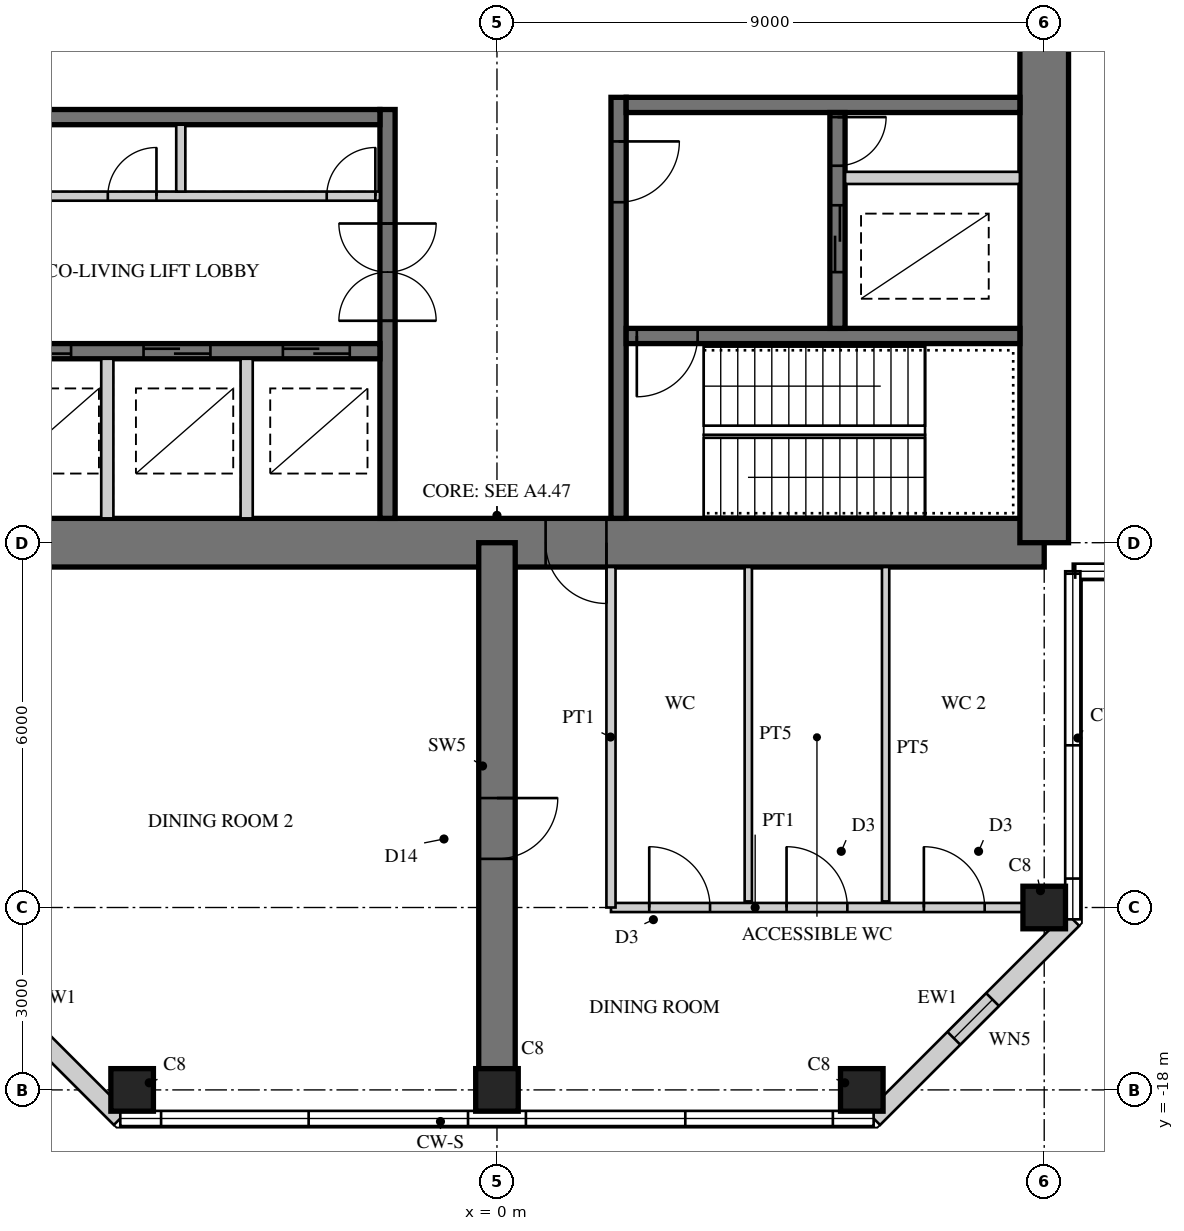
"""IFC4 building model, lengths in metres.
Left out: names, types, materials, properties, quantities, classifications, styles, units other than length and angle.
Written with IfcOpenShell. Run it as: python <this file> out.ifc"""

import sys

from ifc_helpers import new_model, si_unit, direction, frame, frame_2d, origin, origin_2d, place, context, subcontext, project, spatial, rectangle, hollow_rectangle, extrude, element, fill, save


model = new_model("IFC4")
c1 = context("Model", 3, precision=1e-05, world=origin(), true_north=direction((0.0, 1.0)))
c2 = subcontext(c1, "Body", "Model", "MODEL_VIEW")
j1 = project(units=[si_unit("LENGTHUNIT", "METRE"), si_unit("PLANEANGLEUNIT", "RADIAN")], contexts=[c1])
p1 = place(None, origin())
s1 = spatial("IfcSite", under=j1, at=p1, CompositionType="ELEMENT")
p2 = place(p1, origin())
s2 = spatial("IfcBuilding", under=s1, at=p2, CompositionType="ELEMENT")
p3 = place(p2, frame((0.0, 0.0, 288.3)))
s3 = spatial("IfcBuildingStorey", under=s2, at=p3, CompositionType="ELEMENT", Elevation=288.3)
p4 = place(p3, frame((-9.0, -9.0, 0.0), z_axis=(0.0, 0.0, 1.0), x_axis=(1.0, 0.0, 0.0)))
e1 = element("IfcWall", 1, at=p4, inside=s3, PredefinedType="SHEAR", context=c2, shape_type="SweptSolid", body=[
    extrude(rectangle(XDim=18.0, YDim=0.8, at=frame_2d((9.0, 0.0))), origin(), (0.0, 0.0, 1.0), 5.0),
])
p5 = place(p4, frame((9.8, 0.0, 0.0)))
e2 = element("IfcOpeningElement", 2, at=p5, cuts=e1, PredefinedType="OPENING", context=c2, shape_type="SweptSolid", body=[
    extrude(rectangle(XDim=1.0, YDim=2.4, at=frame_2d((0.5, 1.2))), frame((0.0, 0.41, 0.0), z_axis=(0.0, -1.0, 0.0), x_axis=(1.0, 0.0, 0.0)), (0.0, 0.0, 1.0), 0.82),
])
p6 = place(p3, frame((9.0, -9.0, 0.0), z_axis=(0.0, 0.0, 1.0), x_axis=(0.0, 1.0, 0.0)))
e3 = element("IfcWall", 3, at=p6, inside=s3, PredefinedType="SHEAR", context=c2, shape_type="SweptSolid", body=[
    extrude(rectangle(XDim=18.0, YDim=0.8, at=frame_2d((9.0, 0.0))), origin(), (0.0, 0.0, 1.0), 5.0),
])
p7 = place(p6, frame((9.8, 0.0, 0.0)))
e4 = element("IfcOpeningElement", 4, at=p7, cuts=e3, PredefinedType="OPENING", context=c2, shape_type="SweptSolid", body=[
    extrude(rectangle(XDim=1.0, YDim=2.4, at=frame_2d((0.5, 1.2))), frame((0.0, 0.41, 0.0), z_axis=(0.0, -1.0, 0.0), x_axis=(1.0, 0.0, 0.0)), (0.0, 0.0, 1.0), 0.82),
])
p8 = place(p3, frame((-1.8, -1.875, 0.0), z_axis=(0.0, 0.0, 1.0), x_axis=(0.0, -1.0, 0.0)))
e5 = element("IfcWall", 5, at=p8, inside=s3, PredefinedType="SHEAR", context=c2, shape_type="SweptSolid", body=[
    extrude(rectangle(XDim=6.725, YDim=0.25, at=frame_2d((3.363, 0.0))), origin(), (0.0, 0.0, 1.0), 5.0),
])
p9 = place(p8, frame((1.875, 0.0, 0.0)))
e6 = element("IfcOpeningElement", 6, at=p9, cuts=e5, PredefinedType="OPENING", context=c2, shape_type="SweptSolid", body=[
    extrude(rectangle(XDim=1.6, YDim=2.4, at=frame_2d((0.8, 1.2))), frame((0.0, 0.135, 0.0), z_axis=(0.0, -1.0, 0.0), x_axis=(1.0, 0.0, 0.0)), (0.0, 0.0, 1.0), 0.27),
])
p10 = place(p3, frame((-1.925, -2.0, 0.0), z_axis=(0.0, 0.0, 1.0), x_axis=(-1.0, 0.0, 0.0)))
e7 = element("IfcWall", 7, at=p10, inside=s3, PredefinedType="SHEAR", context=c2, shape_type="SweptSolid", body=[
    extrude(rectangle(XDim=6.675, YDim=0.25, at=frame_2d((3.337, 0.0))), origin(), (0.0, 0.0, 1.0), 5.0),
])
p11 = place(p3, frame((-1.925, -5.85, 0.0), z_axis=(0.0, 0.0, 1.0), x_axis=(-1.0, 0.0, 0.0)))
e8 = element("IfcWall", 8, at=p11, inside=s3, PredefinedType="SHEAR", context=c2, shape_type="SweptSolid", body=[
    extrude(rectangle(XDim=6.675, YDim=0.25, at=frame_2d((3.337, 0.0))), origin(), (0.0, 0.0, 1.0), 5.0),
])
p12 = place(p11, frame((0.496, 0.0, 0.0)))
e9 = element("IfcOpeningElement", 9, at=p12, cuts=e8, PredefinedType="OPENING", context=c2, shape_type="SweptSolid", body=[
    extrude(rectangle(XDim=1.1, YDim=2.2, at=frame_2d((0.55, 1.1))), frame((0.0, 0.135, 0.0), z_axis=(0.0, -1.0, 0.0), x_axis=(1.0, 0.0, 0.0)), (0.0, 0.0, 1.0), 0.27),
])
p13 = place(p11, frame((2.788, 0.0, 0.0)))
e10 = element("IfcOpeningElement", 10, at=p13, cuts=e8, PredefinedType="OPENING", context=c2, shape_type="SweptSolid", body=[
    extrude(rectangle(XDim=1.1, YDim=2.2, at=frame_2d((0.55, 1.1))), frame((0.0, 0.135, 0.0), z_axis=(0.0, -1.0, 0.0), x_axis=(1.0, 0.0, 0.0)), (0.0, 0.0, 1.0), 0.27),
])
p14 = place(p11, frame((5.079, 0.0, 0.0)))
e11 = element("IfcOpeningElement", 11, at=p14, cuts=e8, PredefinedType="OPENING", context=c2, shape_type="SweptSolid", body=[
    extrude(rectangle(XDim=1.1, YDim=2.2, at=frame_2d((0.55, 1.1))), frame((0.0, 0.135, 0.0), z_axis=(0.0, -1.0, 0.0), x_axis=(1.0, 0.0, 0.0)), (0.0, 0.0, 1.0), 0.27),
])
p15 = place(p3, frame((-1.925, -3.3, 0.0), z_axis=(0.0, 0.0, 1.0), x_axis=(-1.0, 0.0, 0.0)))
e12 = element("IfcWall", 12, at=p15, inside=s3, PredefinedType="PARTITIONING", context=c2, shape_type="SweptSolid", body=[
    extrude(rectangle(XDim=6.675, YDim=0.15, at=frame_2d((3.337, 0.0))), origin(), (0.0, 0.0, 1.0), 5.0),
])
p16 = place(p15, frame((0.075, 0.0, 0.0)))
e13 = element("IfcOpeningElement", 13, at=p16, cuts=e12, PredefinedType="OPENING", context=c2, shape_type="SweptSolid", body=[
    extrude(rectangle(XDim=0.8, YDim=2.1, at=frame_2d((0.4, 1.05))), frame((0.0, 0.085, 0.0), z_axis=(0.0, -1.0, 0.0), x_axis=(1.0, 0.0, 0.0)), (0.0, 0.0, 1.0), 0.17),
])
p17 = place(p15, frame((3.675, 0.0, 0.0)))
e14 = element("IfcOpeningElement", 14, at=p17, cuts=e12, PredefinedType="OPENING", context=c2, shape_type="SweptSolid", body=[
    extrude(rectangle(XDim=0.8, YDim=2.1, at=frame_2d((0.4, 1.05))), frame((0.0, 0.085, 0.0), z_axis=(0.0, -1.0, 0.0), x_axis=(1.0, 0.0, 0.0)), (0.0, 0.0, 1.0), 0.17),
])
p18 = place(p3, frame((-5.2, -2.125, 0.0), z_axis=(0.0, 0.0, 1.0), x_axis=(0.0, -1.0, 0.0)))
e15 = element("IfcWall", 15, at=p18, inside=s3, PredefinedType="PARTITIONING", context=c2, shape_type="SweptSolid", body=[
    extrude(rectangle(XDim=1.1, YDim=0.15, at=frame_2d((0.55, 0.0))), origin(), (0.0, 0.0, 1.0), 5.0),
])
for number, where, z_axis, x_axis in (
    (16, (-4.117, -5.975, 0.0), (0.0, 0.0, 1.0), (0.0, -1.0, 0.0)),
    (17, (-6.408, -5.975, 0.0), (0.0, 0.0, 1.0), (0.0, -1.0, 0.0)),
):
    element("IfcWall", number, at=place(p3, frame(where, z_axis=z_axis, x_axis=x_axis)), inside=s3, PredefinedType="PARTITIONING", context=c2, shape_type="SweptSolid", body=[
        extrude(rectangle(XDim=2.625, YDim=0.2, at=frame_2d((1.312, 0.0))), origin(), (0.0, 0.0, 1.0), 5.0),
    ])
p19 = place(p3, frame((2.0, -1.675, 0.0), z_axis=(0.0, 0.0, 1.0), x_axis=(0.0, -1.0, 0.0)))
e18 = element("IfcWall", 18, at=p19, inside=s3, PredefinedType="SHEAR", context=c2, shape_type="SweptSolid", body=[
    extrude(rectangle(XDim=6.925, YDim=0.25, at=frame_2d((3.462, 0.0))), origin(), (0.0, 0.0, 1.0), 5.0),
])
p20 = place(p19, frame((0.725, 0.0, 0.0)))
e19 = element("IfcOpeningElement", 19, at=p20, cuts=e18, PredefinedType="OPENING", context=c2, shape_type="SweptSolid", body=[
    extrude(rectangle(XDim=1.0, YDim=2.1, at=frame_2d((0.5, 1.05))), frame((0.0, 0.135, 0.0), z_axis=(0.0, -1.0, 0.0), x_axis=(1.0, 0.0, 0.0)), (0.0, 0.0, 1.0), 0.27),
])
p21 = place(p3, frame((2.125, -1.8, 0.0), z_axis=(0.0, 0.0, 1.0), x_axis=(1.0, 0.0, 0.0)))
e20 = element("IfcWall", 20, at=p21, inside=s3, PredefinedType="SHEAR", context=c2, shape_type="SweptSolid", body=[
    extrude(rectangle(XDim=6.475, YDim=0.25, at=frame_2d((3.238, 0.0))), origin(), (0.0, 0.0, 1.0), 5.0),
])
p22 = place(p3, frame((2.125, -5.6, 0.0), z_axis=(0.0, 0.0, 1.0), x_axis=(1.0, 0.0, 0.0)))
e21 = element("IfcWall", 21, at=p22, inside=s3, PredefinedType="SHEAR", context=c2, shape_type="SweptSolid", body=[
    extrude(rectangle(XDim=6.475, YDim=0.25, at=frame_2d((3.238, 0.0))), origin(), (0.0, 0.0, 1.0), 5.0),
])
p23 = place(p22, frame((0.175, 0.0, 0.0)))
e22 = element("IfcOpeningElement", 22, at=p23, cuts=e21, PredefinedType="OPENING", context=c2, shape_type="SweptSolid", body=[
    extrude(rectangle(XDim=1.0, YDim=2.1, at=frame_2d((0.5, 1.05))), frame((0.0, 0.135, 0.0), z_axis=(0.0, -1.0, 0.0), x_axis=(1.0, 0.0, 0.0)), (0.0, 0.0, 1.0), 0.27),
])
p24 = place(p3, frame((5.6, -1.925, 0.0), z_axis=(0.0, 0.0, 1.0), x_axis=(0.0, -1.0, 0.0)))
e23 = element("IfcWall", 23, at=p24, inside=s3, PredefinedType="SHEAR", context=c2, shape_type="SweptSolid", body=[
    extrude(rectangle(XDim=3.55, YDim=0.25, at=frame_2d((1.775, 0.0))), origin(), (0.0, 0.0, 1.0), 5.0),
])
p25 = place(p24, frame((1.525, 0.0, 0.0)))
e24 = element("IfcOpeningElement", 24, at=p25, cuts=e23, PredefinedType="OPENING", context=c2, shape_type="SweptSolid", body=[
    extrude(rectangle(XDim=1.1, YDim=2.2, at=frame_2d((0.55, 1.1))), frame((0.0, 0.135, 0.0), z_axis=(0.0, -1.0, 0.0), x_axis=(1.0, 0.0, 0.0)), (0.0, 0.0, 1.0), 0.27),
])
p26 = place(p24, frame((0.075, 0.0, 0.0)))
e25 = element("IfcOpeningElement", 25, at=p26, cuts=e23, PredefinedType="OPENING", context=c2, shape_type="SweptSolid", body=[
    extrude(rectangle(XDim=0.8, YDim=2.1, at=frame_2d((0.4, 1.05))), frame((0.0, 0.135, 0.0), z_axis=(0.0, -1.0, 0.0), x_axis=(1.0, 0.0, 0.0)), (0.0, 0.0, 1.0), 0.27),
])
p27 = place(p3, frame((5.725, -3.0, 0.0), z_axis=(0.0, 0.0, 1.0), x_axis=(1.0, 0.0, 0.0)))
e26 = element("IfcWall", 26, at=p27, inside=s3, PredefinedType="PARTITIONING", context=c2, shape_type="SweptSolid", body=[
    extrude(rectangle(XDim=2.875, YDim=0.2, at=frame_2d((1.438, 0.0))), origin(), (0.0, 0.0, 1.0), 5.0),
])
p28 = place(p3, frame((0.0, -9.0, 0.0), z_axis=(0.0, 0.0, 1.0), x_axis=(0.0, -1.0, 0.0)))
e27 = element("IfcWall", 27, at=p28, inside=s3, PredefinedType="SHEAR", context=c2, shape_type="SweptSolid", body=[
    extrude(rectangle(XDim=9.0, YDim=0.6, at=frame_2d((4.5, 0.0))), origin(), (0.0, 0.0, 1.0), 5.0),
])
p29 = place(p28, frame((4.2, 0.0, 0.0)))
e28 = element("IfcOpeningElement", 28, at=p29, cuts=e27, PredefinedType="OPENING", context=c2, shape_type="SweptSolid", body=[
    extrude(rectangle(XDim=1.0, YDim=2.2, at=frame_2d((0.5, 1.1))), frame((0.0, 0.31, 0.0), z_axis=(0.0, -1.0, 0.0), x_axis=(1.0, 0.0, 0.0)), (0.0, 0.0, 1.0), 0.62),
])
for number, where, z_axis, x_axis in (
    (29, (9.0, -15.0, 0.0), (0.0, 0.0, 1.0), (1.0, 0.0, 0.0)),
    (30, (-6.0, -18.0, 0.0), (0.0, 0.0, 1.0), (1.0, 0.0, 0.0)),
    (31, (0.0, -18.0, 0.0), (0.0, 0.0, 1.0), (1.0, 0.0, 0.0)),
    (32, (6.0, -18.0, 0.0), (0.0, 0.0, 1.0), (1.0, 0.0, 0.0)),
):
    element("IfcColumn", number, at=place(p3, frame(where, z_axis=z_axis, x_axis=x_axis)), inside=s3, PredefinedType="COLUMN", context=c2, shape_type="SweptSolid", body=[
        extrude(rectangle(XDim=0.7, YDim=0.7, at=origin_2d()), origin(), (0.0, 0.0, 1.0), 5.0),
    ])
p30 = place(p3, frame((-9.47, -15.195, 0.0), z_axis=(0.0, 0.0, 1.0), x_axis=(0.707106781187, -0.707106781187, 0.0)))
e33 = element("IfcWall", 33, at=p30, inside=s3, PredefinedType="SOLIDWALL", context=c2, shape_type="SweptSolid", body=[
    extrude(rectangle(XDim=4.632, YDim=0.3, at=frame_2d((2.316, 0.0))), origin(), (0.0, 0.0, 1.0), 4.75),
])
p31 = place(p30, frame((1.866, 0.0, 0.3)))
e34 = element("IfcOpeningElement", 34, at=p31, cuts=e33, PredefinedType="OPENING", context=c2, shape_type="SweptSolid", body=[
    extrude(rectangle(XDim=0.9, YDim=2.4, at=frame_2d((0.45, 1.2))), frame((0.0, 0.16, 0.0), z_axis=(0.0, -1.0, 0.0), x_axis=(1.0, 0.0, 0.0)), (0.0, 0.0, 1.0), 0.32),
])
p32 = place(p3, frame((6.195, -18.47, 0.0), z_axis=(0.0, 0.0, 1.0), x_axis=(0.707106781187, 0.707106781187, 0.0)))
e35 = element("IfcWall", 35, at=p32, inside=s3, PredefinedType="SOLIDWALL", context=c2, shape_type="SweptSolid", body=[
    extrude(rectangle(XDim=4.632, YDim=0.3, at=frame_2d((2.316, 0.0))), origin(), (0.0, 0.0, 1.0), 4.75),
])
p33 = place(p32, frame((1.866, 0.0, 0.3)))
e36 = element("IfcOpeningElement", 36, at=p33, cuts=e35, PredefinedType="OPENING", context=c2, shape_type="SweptSolid", body=[
    extrude(rectangle(XDim=0.9, YDim=2.4, at=frame_2d((0.45, 1.2))), frame((0.0, 0.16, 0.0), z_axis=(0.0, -1.0, 0.0), x_axis=(1.0, 0.0, 0.0)), (0.0, 0.0, 1.0), 0.32),
])
p34 = place(p3, frame((1.875, -15.0, 0.0), z_axis=(0.0, 0.0, 1.0), x_axis=(1.0, 0.0, 0.0)))
e37 = element("IfcWall", 37, at=p34, inside=s3, PredefinedType="PARTITIONING", context=c2, shape_type="SweptSolid", body=[
    extrude(rectangle(XDim=6.775, YDim=0.15, at=frame_2d((3.387, 0.0))), origin(), (0.0, 0.0, 1.0), 3.7),
])
p35 = place(p34, frame((0.629, 0.0, 0.0)))
e38 = element("IfcOpeningElement", 38, at=p35, cuts=e37, PredefinedType="OPENING", context=c2, shape_type="SweptSolid", body=[
    extrude(rectangle(XDim=1.0, YDim=2.1, at=frame_2d((0.5, 1.05))), frame((0.0, 0.085, 0.0), z_axis=(0.0, -1.0, 0.0), x_axis=(1.0, 0.0, 0.0)), (0.0, 0.0, 1.0), 0.17),
])
p36 = place(p34, frame((2.887, 0.0, 0.0)))
e39 = element("IfcOpeningElement", 39, at=p36, cuts=e37, PredefinedType="OPENING", context=c2, shape_type="SweptSolid", body=[
    extrude(rectangle(XDim=1.0, YDim=2.1, at=frame_2d((0.5, 1.05))), frame((0.0, 0.085, 0.0), z_axis=(0.0, -1.0, 0.0), x_axis=(1.0, 0.0, 0.0)), (0.0, 0.0, 1.0), 0.17),
])
p37 = place(p34, frame((5.146, 0.0, 0.0)))
e40 = element("IfcOpeningElement", 40, at=p37, cuts=e37, PredefinedType="OPENING", context=c2, shape_type="SweptSolid", body=[
    extrude(rectangle(XDim=1.0, YDim=2.1, at=frame_2d((0.5, 1.05))), frame((0.0, 0.085, 0.0), z_axis=(0.0, -1.0, 0.0), x_axis=(1.0, 0.0, 0.0)), (0.0, 0.0, 1.0), 0.17),
])
p38 = place(p3, frame((1.875, -9.4, 0.0), z_axis=(0.0, 0.0, 1.0), x_axis=(0.0, -1.0, 0.0)))
e41 = element("IfcWall", 41, at=p38, inside=s3, PredefinedType="PARTITIONING", context=c2, shape_type="SweptSolid", body=[
    extrude(rectangle(XDim=5.6, YDim=0.15, at=frame_2d((2.8, 0.0))), origin(), (0.0, 0.0, 1.0), 4.75),
])
for number, where, z_axis, x_axis in (
    (42, (4.133, -9.4, 0.0), (0.0, 0.0, 1.0), (0.0, -1.0, 0.0)),
    (43, (6.392, -9.4, 0.0), (0.0, 0.0, 1.0), (0.0, -1.0, 0.0)),
):
    element("IfcWall", number, at=place(p3, frame(where, z_axis=z_axis, x_axis=x_axis)), inside=s3, PredefinedType="PLUMBINGWALL", context=c2, shape_type="SweptSolid", body=[
        extrude(rectangle(XDim=5.5, YDim=0.12, at=frame_2d((2.75, 0.0))), origin(), (0.0, 0.0, 1.0), 4.75),
    ])
p39 = place(p33, origin())
e44 = element("IfcWindow", 44, at=p39, inside=s3, PartitioningType="SINGLE_PANEL", PredefinedType="WINDOW", context=c2, shape_type="SweptSolid", body=[
    extrude(hollow_rectangle(XDim=0.9, YDim=2.4, WallThickness=0.06, at=frame_2d((0.45, 1.2))), frame((0.0, 0.03, 0.0), z_axis=(0.0, -1.0, 0.0), x_axis=(1.0, 0.0, 0.0)), (0.0, 0.0, 1.0), 0.06),
    extrude(rectangle(XDim=0.779, YDim=2.279, at=frame_2d((0.45, 1.2))), frame((0.0, 0.03, 0.0), z_axis=(0.0, -1.0, 0.0), x_axis=(1.0, 0.0, 0.0)), (0.0, 0.0, 1.0), 0.06),
])
fill(e36, e44)
p40 = place(p35, origin())
e45 = element("IfcDoor", 45, at=p40, inside=s3, OperationType="SINGLE_SWING_LEFT", PredefinedType="DOOR", context=c2, shape_type="SweptSolid", body=[
    extrude(rectangle(XDim=1.0, YDim=2.1, at=frame_2d((0.5, 1.05))), frame((0.0, 0.025, 0.0), z_axis=(0.0, -1.0, 0.0), x_axis=(1.0, 0.0, 0.0)), (0.0, 0.0, 1.0), 0.05),
])
fill(e38, e45)
p41 = place(p36, origin())
e46 = element("IfcDoor", 46, at=p41, inside=s3, OperationType="SINGLE_SWING_LEFT", PredefinedType="DOOR", context=c2, shape_type="SweptSolid", body=[
    extrude(rectangle(XDim=1.0, YDim=2.1, at=frame_2d((0.5, 1.05))), frame((0.0, 0.025, 0.0), z_axis=(0.0, -1.0, 0.0), x_axis=(1.0, 0.0, 0.0)), (0.0, 0.0, 1.0), 0.05),
])
fill(e39, e46)
p42 = place(p37, origin())
e47 = element("IfcDoor", 47, at=p42, inside=s3, OperationType="SINGLE_SWING_LEFT", PredefinedType="DOOR", context=c2, shape_type="SweptSolid", body=[
    extrude(rectangle(XDim=1.0, YDim=2.1, at=frame_2d((0.5, 1.05))), frame((0.0, 0.025, 0.0), z_axis=(0.0, -1.0, 0.0), x_axis=(1.0, 0.0, 0.0)), (0.0, 0.0, 1.0), 0.05),
])
fill(e40, e47)
p43 = place(p29, origin())
e48 = element("IfcDoor", 48, at=p43, inside=s3, OperationType="SINGLE_SWING_LEFT", PredefinedType="DOOR", context=c2, shape_type="SweptSolid", body=[
    extrude(rectangle(XDim=1.0, YDim=2.2, at=frame_2d((0.5, 1.1))), frame((0.0, 0.025, 0.0), z_axis=(0.0, -1.0, 0.0), x_axis=(1.0, 0.0, 0.0)), (0.0, 0.0, 1.0), 0.05),
])
fill(e28, e48)
p44 = place(p5, frame((1.0, 0.0, 0.0), z_axis=(0.0, 0.0, 1.0), x_axis=(-1.0, 0.0, 0.0)))
e49 = element("IfcDoor", 49, at=p44, inside=s3, OperationType="SINGLE_SWING_LEFT", PredefinedType="DOOR", context=c2, shape_type="SweptSolid", body=[
    extrude(rectangle(XDim=1.0, YDim=2.4, at=frame_2d((0.5, 1.2))), frame((0.0, -0.005, 0.0), z_axis=(0.0, -1.0, 0.0), x_axis=(1.0, 0.0, 0.0)), (0.0, 0.0, 1.0), 0.05),
])
fill(e2, e49)
p45 = place(p12, origin())
e50 = element("IfcDoor", 50, at=p45, inside=s3, OperationType="DOUBLE_DOOR_SLIDING", PredefinedType="DOOR", context=c2, shape_type="SweptSolid", body=[
    extrude(rectangle(XDim=1.1, YDim=2.2, at=frame_2d((0.55, 1.1))), frame((0.0, 0.025, 0.0), z_axis=(0.0, -1.0, 0.0), x_axis=(1.0, 0.0, 0.0)), (0.0, 0.0, 1.0), 0.05),
])
fill(e9, e50)
p46 = place(p13, origin())
e51 = element("IfcDoor", 51, at=p46, inside=s3, OperationType="DOUBLE_DOOR_SLIDING", PredefinedType="DOOR", context=c2, shape_type="SweptSolid", body=[
    extrude(rectangle(XDim=1.1, YDim=2.2, at=frame_2d((0.55, 1.1))), frame((0.0, 0.025, 0.0), z_axis=(0.0, -1.0, 0.0), x_axis=(1.0, 0.0, 0.0)), (0.0, 0.0, 1.0), 0.05),
])
fill(e10, e51)
p47 = place(p14, origin())
e52 = element("IfcDoor", 52, at=p47, inside=s3, OperationType="DOUBLE_DOOR_SLIDING", PredefinedType="DOOR", context=c2, shape_type="SweptSolid", body=[
    extrude(rectangle(XDim=1.1, YDim=2.2, at=frame_2d((0.55, 1.1))), frame((0.0, 0.025, 0.0), z_axis=(0.0, -1.0, 0.0), x_axis=(1.0, 0.0, 0.0)), (0.0, 0.0, 1.0), 0.05),
])
fill(e11, e52)
p48 = place(p9, origin())
e53 = element("IfcDoor", 53, at=p48, inside=s3, OperationType="DOUBLE_DOOR_DOUBLE_SWING", PredefinedType="DOOR", context=c2, shape_type="SweptSolid", body=[
    extrude(rectangle(XDim=1.6, YDim=2.4, at=frame_2d((0.8, 1.2))), frame((0.0, 0.025, 0.0), z_axis=(0.0, -1.0, 0.0), x_axis=(1.0, 0.0, 0.0)), (0.0, 0.0, 1.0), 0.05),
])
fill(e6, e53)
p49 = place(p16, frame((0.8, 0.0, 0.0), z_axis=(0.0, 0.0, 1.0), x_axis=(-1.0, 0.0, 0.0)))
e54 = element("IfcDoor", 54, at=p49, inside=s3, OperationType="SINGLE_SWING_RIGHT", PredefinedType="DOOR", context=c2, shape_type="SweptSolid", body=[
    extrude(rectangle(XDim=0.8, YDim=2.1, at=frame_2d((0.4, 1.05))), frame((0.0, 0.025, 0.0), z_axis=(0.0, -1.0, 0.0), x_axis=(1.0, 0.0, 0.0)), (0.0, 0.0, 1.0), 0.05),
])
fill(e13, e54)
p50 = place(p17, frame((0.8, 0.0, 0.0), z_axis=(0.0, 0.0, 1.0), x_axis=(-1.0, 0.0, 0.0)))
e55 = element("IfcDoor", 55, at=p50, inside=s3, OperationType="SINGLE_SWING_RIGHT", PredefinedType="DOOR", context=c2, shape_type="SweptSolid", body=[
    extrude(rectangle(XDim=0.8, YDim=2.1, at=frame_2d((0.4, 1.05))), frame((0.0, 0.025, 0.0), z_axis=(0.0, -1.0, 0.0), x_axis=(1.0, 0.0, 0.0)), (0.0, 0.0, 1.0), 0.05),
])
fill(e14, e55)
p51 = place(p20, origin())
e56 = element("IfcDoor", 56, at=p51, inside=s3, OperationType="SINGLE_SWING_LEFT", PredefinedType="DOOR", context=c2, shape_type="SweptSolid", body=[
    extrude(rectangle(XDim=1.0, YDim=2.1, at=frame_2d((0.5, 1.05))), frame((0.0, 0.025, 0.0), z_axis=(0.0, -1.0, 0.0), x_axis=(1.0, 0.0, 0.0)), (0.0, 0.0, 1.0), 0.05),
])
fill(e19, e56)
p52 = place(p23, frame((1.0, 0.0, 0.0), z_axis=(0.0, 0.0, 1.0), x_axis=(-1.0, 0.0, 0.0)))
e57 = element("IfcDoor", 57, at=p52, inside=s3, OperationType="SINGLE_SWING_RIGHT", PredefinedType="DOOR", context=c2, shape_type="SweptSolid", body=[
    extrude(rectangle(XDim=1.0, YDim=2.1, at=frame_2d((0.5, 1.05))), frame((0.0, 0.025, 0.0), z_axis=(0.0, -1.0, 0.0), x_axis=(1.0, 0.0, 0.0)), (0.0, 0.0, 1.0), 0.05),
])
fill(e22, e57)
p53 = place(p25, origin())
e58 = element("IfcDoor", 58, at=p53, inside=s3, OperationType="DOUBLE_DOOR_SLIDING", PredefinedType="DOOR", context=c2, shape_type="SweptSolid", body=[
    extrude(rectangle(XDim=1.1, YDim=2.2, at=frame_2d((0.55, 1.1))), frame((0.0, 0.025, 0.0), z_axis=(0.0, -1.0, 0.0), x_axis=(1.0, 0.0, 0.0)), (0.0, 0.0, 1.0), 0.05),
])
fill(e24, e58)
p54 = place(p26, origin())
e59 = element("IfcDoor", 59, at=p54, inside=s3, OperationType="SINGLE_SWING_LEFT", PredefinedType="DOOR", context=c2, shape_type="SweptSolid", body=[
    extrude(rectangle(XDim=0.8, YDim=2.1, at=frame_2d((0.4, 1.05))), frame((0.0, 0.025, 0.0), z_axis=(0.0, -1.0, 0.0), x_axis=(1.0, 0.0, 0.0)), (0.0, 0.0, 1.0), 0.05),
])
fill(e25, e59)
save(model, sys.argv[1])
